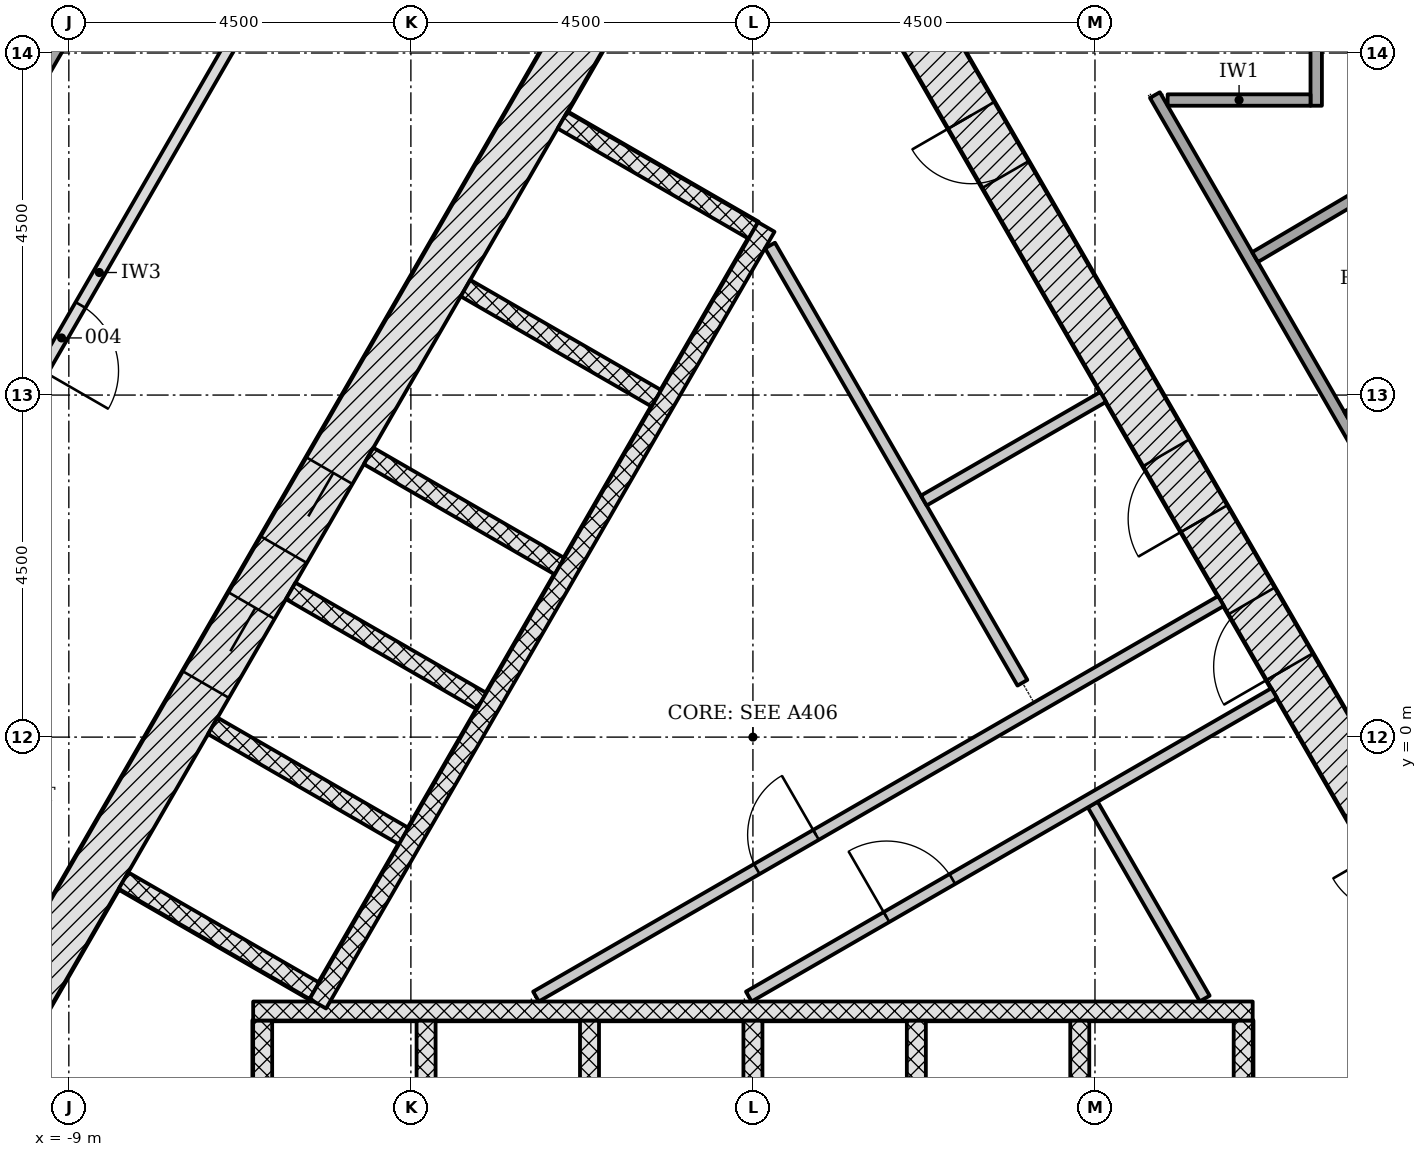
"""IFC4 building model, lengths in metres.
Left out: names, types, materials, properties, quantities, classifications, styles, units other than length and angle.
Written with IfcOpenShell. Run it as: python <this file> out.ifc"""

import sys

from ifc_helpers import new_model, si_unit, direction, frame, frame_2d, origin, place, context, subcontext, project, spatial, rectangle, extrude, element, fill, save


model = new_model("IFC4")
c1 = context("Model", 3, precision=1e-05, world=origin(), true_north=direction((0.0, 1.0)))
c2 = subcontext(c1, "Body", "Model", "MODEL_VIEW")
j1 = project(units=[si_unit("LENGTHUNIT", "METRE"), si_unit("PLANEANGLEUNIT", "RADIAN")], contexts=[c1])
p1 = place(None, origin())
s1 = spatial("IfcSite", under=j1, at=p1, CompositionType="ELEMENT")
p2 = place(p1, origin())
s2 = spatial("IfcBuilding", under=s1, at=p2, CompositionType="ELEMENT")
p3 = place(p2, frame((0.0, 0.0, 98.7)))
s3 = spatial("IfcBuildingStorey", under=s2, at=p3, CompositionType="ELEMENT", Elevation=98.7)
p4 = place(p3, frame((10.311, -4.703, -0.2), z_axis=(0.0, 0.0, 1.0), x_axis=(-0.500001446645, 0.866024568562, 0.0)))
e1 = element("IfcWall", 1, at=p4, inside=s3, PredefinedType="SHEAR", context=c2, shape_type="SweptSolid", body=[
    extrude(rectangle(XDim=18.458, YDim=0.7, at=frame_2d((9.229, 0.0))), origin(), (0.0, 0.0, 1.0), 3.6),
])
p5 = place(p4, frame((6.5, 0.0, 0.2)))
e2 = element("IfcOpeningElement", 2, at=p5, cuts=e1, PredefinedType="OPENING", context=c2, shape_type="SweptSolid", body=[
    extrude(rectangle(XDim=1.0, YDim=2.1, at=frame_2d((0.5, 1.05))), frame((0.0, 0.36, 0.0), z_axis=(0.0, -1.0, 0.0), x_axis=(1.0, 0.0, 0.0)), (0.0, 0.0, 1.0), 0.72),
])
p6 = place(p4, frame((2.902, 0.0, 0.2)))
e3 = element("IfcOpeningElement", 3, at=p6, cuts=e1, PredefinedType="OPENING", context=c2, shape_type="SweptSolid", body=[
    extrude(rectangle(XDim=0.9, YDim=2.1, at=frame_2d((0.45, 1.05))), frame((0.0, 0.36, 0.0), z_axis=(0.0, -1.0, 0.0), x_axis=(1.0, 0.0, 0.0)), (0.0, 0.0, 1.0), 0.72),
])
p7 = place(p4, frame((8.75, 0.0, 0.2)))
e4 = element("IfcOpeningElement", 4, at=p7, cuts=e1, PredefinedType="OPENING", context=c2, shape_type="SweptSolid", body=[
    extrude(rectangle(XDim=1.0, YDim=2.1, at=frame_2d((0.5, 1.05))), frame((0.0, 0.36, 0.0), z_axis=(0.0, -1.0, 0.0), x_axis=(1.0, 0.0, 0.0)), (0.0, 0.0, 1.0), 0.72),
])
p8 = place(p4, frame((13.977, 0.0, 0.2)))
e5 = element("IfcOpeningElement", 5, at=p8, cuts=e1, PredefinedType="OPENING", context=c2, shape_type="SweptSolid", body=[
    extrude(rectangle(XDim=0.9, YDim=2.1, at=frame_2d((0.45, 1.05))), frame((0.0, 0.36, 0.0), z_axis=(0.0, -1.0, 0.0), x_axis=(1.0, 0.0, 0.0)), (0.0, 0.0, 1.0), 0.72),
])
p9 = place(p3, frame((-1.083, 11.281, -0.2), z_axis=(0.0, 0.0, 1.0), x_axis=(-0.500001446645, -0.866024568562, 0.0)))
e6 = element("IfcWall", 6, at=p9, inside=s3, PredefinedType="SHEAR", context=c2, shape_type="SweptSolid", body=[
    extrude(rectangle(XDim=18.458, YDim=0.7, at=frame_2d((9.229, 0.0))), origin(), (0.0, 0.0, 1.0), 3.6),
])
p10 = place(p9, frame((8.979, 0.0, 0.2)))
e7 = element("IfcOpeningElement", 7, at=p10, cuts=e6, PredefinedType="OPENING", context=c2, shape_type="SweptSolid", body=[
    extrude(rectangle(XDim=1.2, YDim=2.1, at=frame_2d((0.6, 1.05))), frame((0.0, 0.36, 0.0), z_axis=(0.0, -1.0, 0.0), x_axis=(1.0, 0.0, 0.0)), (0.0, 0.0, 1.0), 0.72),
])
p11 = place(p9, frame((11.029, 0.0, 0.2)))
e8 = element("IfcOpeningElement", 8, at=p11, cuts=e6, PredefinedType="OPENING", context=c2, shape_type="SweptSolid", body=[
    extrude(rectangle(XDim=1.2, YDim=2.1, at=frame_2d((0.6, 1.05))), frame((0.0, 0.36, 0.0), z_axis=(0.0, -1.0, 0.0), x_axis=(1.0, 0.0, 0.0)), (0.0, 0.0, 1.0), 0.72),
])
p12 = place(p3, frame((-10.311, -4.353, -0.2), z_axis=(0.0, 0.0, 1.0), x_axis=(0.500042739161, -0.866000726912, 0.0)))
e9 = element("IfcWall", 9, at=p12, inside=s3, PredefinedType="SHEAR", context=c2, shape_type="SweptSolid", body=[
    extrude(rectangle(XDim=2.771, YDim=0.7, at=frame_2d((1.386, 0.0))), origin(), (0.0, 0.0, 1.0), 3.6),
])
for number, where, z_axis, x_axis in (
    (10, (-6.45, -6.228, -0.2), (0.0, 0.0, 1.0), (0.0, 1.0, 0.0)),
    (11, (-4.3, -6.228, -0.2), (0.0, 0.0, 1.0), (0.0, 1.0, 0.0)),
    (12, (-2.15, -6.228, -0.2), (0.0, 0.0, 1.0), (0.0, 1.0, 0.0)),
    (13, (0.0, -6.228, -0.2), (0.0, 0.0, 1.0), (0.0, 1.0, 0.0)),
    (14, (2.15, -6.228, -0.2), (0.0, 0.0, 1.0), (0.0, 1.0, 0.0)),
    (15, (4.3, -6.228, -0.2), (0.0, 0.0, 1.0), (0.0, 1.0, 0.0)),
    (16, (6.45, -6.228, -0.2), (0.0, 0.0, 1.0), (0.0, 1.0, 0.0)),
):
    element("IfcWall", number, at=place(p3, frame(where, z_axis=z_axis, x_axis=x_axis)), inside=s3, PredefinedType="PARTITIONING", context=c2, shape_type="SweptSolid", body=[
        extrude(rectangle(XDim=2.5, YDim=0.25, at=frame_2d((1.25, 0.0))), origin(), (0.0, 0.0, 1.0), 3.6),
    ])
p13 = place(p3, frame((-6.575, -3.603, 0.0), z_axis=(0.0, 0.0, 1.0), x_axis=(1.0, 0.0, 0.0)))
e17 = element("IfcWall", 17, at=p13, inside=s3, PredefinedType="PARTITIONING", context=c2, shape_type="SweptSolid", body=[
    extrude(rectangle(XDim=13.15, YDim=0.25, at=frame_2d((6.575, 0.0))), origin(), (0.0, 0.0, 1.0), 3.4),
])
p14 = place(p3, frame((-2.506, 8.115, -0.2), z_axis=(0.0, 0.0, 1.0), x_axis=(0.865996321171, -0.50005036918, 0.0)))
e18 = element("IfcWall", 18, at=p14, inside=s3, PredefinedType="PARTITIONING", context=c2, shape_type="SweptSolid", body=[
    extrude(rectangle(XDim=2.9, YDim=0.25, at=frame_2d((1.45, 0.0))), origin(), (0.0, 0.0, 1.0), 3.6),
])
for number, where, z_axis, x_axis in (
    (19, (-3.781, 5.907, -0.2), (0.0, 0.0, 1.0), (0.866, -0.5, 0.0)),
    (20, (-5.056, 3.699, -0.2), (0.0, 0.0, 1.0), (0.866, -0.5, 0.0)),
    (21, (-6.081, 1.923, -0.2), (0.0, 0.0, 1.0), (0.866, -0.5, 0.0)),
    (22, (-7.106, 0.148, -0.2), (0.0, 0.0, 1.0), (0.866, -0.5, 0.0)),
    (23, (-8.281, -1.887, -0.2), (0.0, 0.0, 1.0), (0.866, -0.5, 0.0)),
):
    element("IfcWall", number, at=place(p3, frame(where, z_axis=z_axis, x_axis=x_axis)), inside=s3, PredefinedType="PARTITIONING", context=c2, shape_type="SweptSolid", body=[
        extrude(rectangle(XDim=2.9, YDim=0.25, at=frame_2d((1.45, 0.0))), origin(), (0.0, 0.0, 1.0), 3.6),
    ])
p15 = place(p3, frame((0.176, 6.711, 0.0), z_axis=(0.0, 0.0, 1.0), x_axis=(-0.500004227369, -0.866022963098, 0.0)))
e24 = element("IfcWall", 24, at=p15, inside=s3, PredefinedType="PARTITIONING", context=c2, shape_type="SweptSolid", body=[
    extrude(rectangle(XDim=11.8, YDim=0.25, at=frame_2d((5.9, 0.0))), origin(), (0.0, 0.0, 1.0), 3.4),
])
p16 = place(p3, frame((-2.854, -3.413, 0.0), z_axis=(0.0, 0.0, 1.0), x_axis=(0.866030102318, 0.499991861813, 0.0)))
e25 = element("IfcWall", 25, at=p16, inside=s3, PredefinedType="PARTITIONING", context=c2, shape_type="SweptSolid", body=[
    extrude(rectangle(XDim=10.407, YDim=0.15, at=frame_2d((5.204, 0.0))), origin(), (0.0, 0.0, 1.0), 3.4),
])
p17 = place(p16, frame((3.354, 0.0, 0.0)))
e26 = element("IfcOpeningElement", 26, at=p17, cuts=e25, PredefinedType="OPENING", context=c2, shape_type="SweptSolid", body=[
    extrude(rectangle(XDim=0.9, YDim=2.1, at=frame_2d((0.45, 1.05))), frame((0.0, 0.085, 0.0), z_axis=(0.0, -1.0, 0.0), x_axis=(1.0, 0.0, 0.0)), (0.0, 0.0, 1.0), 0.17),
])
p18 = place(p3, frame((5.944, -3.439, 0.0), z_axis=(0.0, 0.0, 1.0), x_axis=(-0.499997367627, 0.86602692358, 0.0)))
e27 = element("IfcWall", 27, at=p18, inside=s3, PredefinedType="PARTITIONING", context=c2, shape_type="SweptSolid", body=[
    extrude(rectangle(XDim=2.947, YDim=0.15, at=frame_2d((1.473, 0.0))), origin(), (0.0, 0.0, 1.0), 3.4),
])
p19 = place(p3, frame((-0.054, -3.413, 0.0), z_axis=(0.0, 0.0, 1.0), x_axis=(0.866026668906, 0.499997808738, 0.0)))
e28 = element("IfcWall", 28, at=p19, inside=s3, PredefinedType="PARTITIONING", context=c2, shape_type="SweptSolid", body=[
    extrude(rectangle(XDim=7.982, YDim=0.15, at=frame_2d((3.991, 0.0))), origin(), (0.0, 0.0, 1.0), 3.4),
])
p20 = place(p19, frame((2.092, 0.0, 0.0)))
e29 = element("IfcOpeningElement", 29, at=p20, cuts=e28, PredefinedType="OPENING", context=c2, shape_type="SweptSolid", body=[
    extrude(rectangle(XDim=1.0, YDim=2.1, at=frame_2d((0.5, 1.05))), frame((0.0, 0.085, 0.0), z_axis=(0.0, -1.0, 0.0), x_axis=(1.0, 0.0, 0.0)), (0.0, 0.0, 1.0), 0.17),
])
p21 = place(p3, frame((3.546, 0.715, 0.0), z_axis=(0.0, 0.0, 1.0), x_axis=(-0.50002895357, 0.866008686788, 0.0)))
e30 = element("IfcWall", 30, at=p21, inside=s3, PredefinedType="PARTITIONING", context=c2, shape_type="SweptSolid", body=[
    extrude(rectangle(XDim=6.642, YDim=0.15, at=frame_2d((3.321, 0.0))), origin(), (0.0, 0.0, 1.0), 3.4),
])
p22 = place(p3, frame((2.248, 3.112, 0.0), z_axis=(0.0, 0.0, 1.0), x_axis=(0.866012511928, 0.500022328685, 0.0)))
e31 = element("IfcWall", 31, at=p22, inside=s3, PredefinedType="PARTITIONING", context=c2, shape_type="SweptSolid", body=[
    extrude(rectangle(XDim=2.725, YDim=0.15, at=frame_2d((1.363, 0.0))), origin(), (0.0, 0.0, 1.0), 3.4),
])
p23 = place(p3, frame((-16.169, -3.099, 0.0), z_axis=(0.0, 0.0, 1.0), x_axis=(0.499999805269, 0.866025516212, 0.0)))
e32 = element("IfcWall", 32, at=p23, inside=s3, PredefinedType="PARTITIONING", context=c2, shape_type="SweptSolid", body=[
    extrude(rectangle(XDim=22.097, YDim=0.15, at=frame_2d((11.049, 0.0))), origin(), (0.0, 0.0, 1.0), 2.778),
])
p24 = place(p23, frame((16.878, 0.0, 0.0)))
e33 = element("IfcOpeningElement", 33, at=p24, cuts=e32, PredefinedType="OPENING", context=c2, shape_type="SweptSolid", body=[
    extrude(rectangle(XDim=1.0, YDim=2.1, at=frame_2d((0.5, 1.05))), frame((0.0, 0.085, 0.0), z_axis=(0.0, -1.0, 0.0), x_axis=(1.0, 0.0, 0.0)), (0.0, 0.0, 1.0), 0.17),
])
p25 = place(p23, frame((7.816, 0.0, 0.0)))
e34 = element("IfcOpeningElement", 34, at=p25, cuts=e32, PredefinedType="OPENING", context=c2, shape_type="SweptSolid", body=[
    extrude(rectangle(XDim=1.5, YDim=2.1, at=frame_2d((0.75, 1.05))), frame((0.0, 0.085, 0.0), z_axis=(0.0, -1.0, 0.0), x_axis=(1.0, 0.0, 0.0)), (0.0, 0.0, 1.0), 0.17),
])
p26 = place(p23, frame((1.2, 0.0, 0.0)))
e35 = element("IfcOpeningElement", 35, at=p26, cuts=e32, PredefinedType="OPENING", context=c2, shape_type="SweptSolid", body=[
    extrude(rectangle(XDim=1.5, YDim=2.1, at=frame_2d((0.75, 1.05))), frame((0.0, 0.085, 0.0), z_axis=(0.0, -1.0, 0.0), x_axis=(1.0, 0.0, 0.0)), (0.0, 0.0, 1.0), 0.17),
])
p27 = place(p3, frame((-4.407, 13.374, 0.0), z_axis=(0.0, 0.0, 1.0), x_axis=(-0.499997181693, -0.866027030928, 0.0)))
e36 = element("IfcWall", 36, at=p27, inside=s3, PredefinedType="PARTITIONING", context=c2, shape_type="SweptSolid", body=[
    extrude(rectangle(XDim=16.77, YDim=0.15, at=frame_2d((8.385, 0.0))), origin(), (0.0, 0.0, 1.0), 2.778),
])
p28 = place(p27, frame((8.879, 0.0, 0.0)))
e37 = element("IfcOpeningElement", 37, at=p28, cuts=e36, PredefinedType="OPENING", context=c2, shape_type="SweptSolid", body=[
    extrude(rectangle(XDim=1.0, YDim=2.1, at=frame_2d((0.5, 1.05))), frame((0.0, 0.085, 0.0), z_axis=(0.0, -1.0, 0.0), x_axis=(1.0, 0.0, 0.0)), (0.0, 0.0, 1.0), 0.17),
])
p29 = place(p3, frame((5.289, 8.446, 0.0), z_axis=(0.0, 0.0, 1.0), x_axis=(0.499996620721, -0.866027354803, 0.0)))
e38 = element("IfcWall", 38, at=p29, inside=s3, PredefinedType="PARTITIONING", context=c2, shape_type="SweptSolid", body=[
    extrude(rectangle(XDim=15.057, YDim=0.15, at=frame_2d((7.528, 0.0))), origin(), (0.0, 0.0, 1.0), 2.778),
])
p30 = place(p29, frame((12.566, 0.0, 0.0)))
e39 = element("IfcOpeningElement", 39, at=p30, cuts=e38, PredefinedType="OPENING", context=c2, shape_type="SweptSolid", body=[
    extrude(rectangle(XDim=1.0, YDim=2.1, at=frame_2d((0.5, 1.05))), frame((0.0, 0.085, 0.0), z_axis=(0.0, -1.0, 0.0), x_axis=(1.0, 0.0, 0.0)), (0.0, 0.0, 1.0), 0.17),
])
p31 = place(p29, frame((7.316, 0.0, 0.0)))
e40 = element("IfcOpeningElement", 40, at=p31, cuts=e38, PredefinedType="OPENING", context=c2, shape_type="SweptSolid", body=[
    extrude(rectangle(XDim=1.0, YDim=2.1, at=frame_2d((0.5, 1.05))), frame((0.0, 0.085, 0.0), z_axis=(0.0, -1.0, 0.0), x_axis=(1.0, 0.0, 0.0)), (0.0, 0.0, 1.0), 0.17),
])
p32 = place(p29, frame((5.357, 0.0, 0.0)))
e41 = element("IfcOpeningElement", 41, at=p32, cuts=e38, PredefinedType="OPENING", context=c2, shape_type="SweptSolid", body=[
    extrude(rectangle(XDim=1.0, YDim=2.1, at=frame_2d((0.5, 1.05))), frame((0.0, 0.085, 0.0), z_axis=(0.0, -1.0, 0.0), x_axis=(1.0, 0.0, 0.0)), (0.0, 0.0, 1.0), 0.17),
])
p33 = place(p3, frame((7.411, 14.256, 0.0), z_axis=(0.0, 0.0, 1.0), x_axis=(0.0, -1.0, 0.0)))
e42 = element("IfcWall", 42, at=p33, inside=s3, PredefinedType="PARTITIONING", context=c2, shape_type="SweptSolid", body=[
    extrude(rectangle(XDim=5.95, YDim=0.15, at=frame_2d((2.975, 0.0))), origin(), (0.0, 0.0, 1.0), 2.778),
])
p34 = place(p33, frame((2.475, 0.0, 0.0)))
e43 = element("IfcOpeningElement", 43, at=p34, cuts=e42, PredefinedType="OPENING", context=c2, shape_type="SweptSolid", body=[
    extrude(rectangle(XDim=1.0, YDim=2.1, at=frame_2d((0.5, 1.05))), frame((0.0, 0.085, 0.0), z_axis=(0.0, -1.0, 0.0), x_axis=(1.0, 0.0, 0.0)), (0.0, 0.0, 1.0), 0.17),
])
p35 = place(p3, frame((5.456, 8.381, 0.0), z_axis=(0.0, 0.0, 1.0), x_axis=(1.0, 0.0, 0.0)))
e44 = element("IfcWall", 44, at=p35, inside=s3, PredefinedType="PARTITIONING", context=c2, shape_type="SweptSolid", body=[
    extrude(rectangle(XDim=1.88, YDim=0.15, at=frame_2d((0.94, 0.0))), origin(), (0.0, 0.0, 1.0), 3.4),
])
p36 = place(p3, frame((13.269, 10.25, 0.0), z_axis=(0.0, 0.0, 1.0), x_axis=(-0.861057776749, -0.508507133775, 0.0)))
e45 = element("IfcWall", 45, at=p36, inside=s3, PredefinedType="PARTITIONING", context=c2, shape_type="SweptSolid", body=[
    extrude(rectangle(XDim=7.738, YDim=0.15, at=frame_2d((3.869, 0.0))), origin(), (0.0, 0.0, 1.0), 2.778),
])
p37 = place(p3, frame((7.805, 4.237, 0.0), z_axis=(0.0, 0.0, 1.0), x_axis=(0.866006032174, 0.500033551112, 0.0)))
e46 = element("IfcWall", 46, at=p37, inside=s3, PredefinedType="PARTITIONING", context=c2, shape_type="SweptSolid", body=[
    extrude(rectangle(XDim=2.4, YDim=0.1, at=frame_2d((1.2, 0.0))), origin(), (0.0, 0.0, 1.0), 3.4),
])
p38 = place(p37, frame((0.7, 0.0, 0.0)))
e47 = element("IfcOpeningElement", 47, at=p38, cuts=e46, PredefinedType="OPENING", context=c2, shape_type="SweptSolid", body=[
    extrude(rectangle(XDim=1.0, YDim=2.1, at=frame_2d((0.5, 1.05))), frame((0.0, 0.06, 0.0), z_axis=(0.0, -1.0, 0.0), x_axis=(1.0, 0.0, 0.0)), (0.0, 0.0, 1.0), 0.12),
])
p39 = place(p10, origin())
e48 = element("IfcDoor", 48, at=p39, inside=s3, OperationType="DOUBLE_DOOR_SLIDING", PredefinedType="DOOR", context=c2, shape_type="SweptSolid", body=[
    extrude(rectangle(XDim=1.2, YDim=2.1, at=frame_2d((0.6, 1.05))), frame((0.0, 0.025, 0.0), z_axis=(0.0, -1.0, 0.0), x_axis=(1.0, 0.0, 0.0)), (0.0, 0.0, 1.0), 0.05),
])
fill(e7, e48)
p40 = place(p11, origin())
e49 = element("IfcDoor", 49, at=p40, inside=s3, OperationType="DOUBLE_DOOR_SLIDING", PredefinedType="DOOR", context=c2, shape_type="SweptSolid", body=[
    extrude(rectangle(XDim=1.2, YDim=2.1, at=frame_2d((0.6, 1.05))), frame((0.0, 0.025, 0.0), z_axis=(0.0, -1.0, 0.0), x_axis=(1.0, 0.0, 0.0)), (0.0, 0.0, 1.0), 0.05),
])
fill(e8, e49)
p41 = place(p5, origin())
e50 = element("IfcDoor", 50, at=p41, inside=s3, OperationType="SINGLE_SWING_LEFT", PredefinedType="DOOR", context=c2, shape_type="SweptSolid", body=[
    extrude(rectangle(XDim=1.0, YDim=2.1, at=frame_2d((0.5, 1.05))), frame((0.0, 0.075, 0.0), z_axis=(0.0, -1.0, 0.0), x_axis=(1.0, 0.0, 0.0)), (0.0, 0.0, 1.0), 0.15),
])
fill(e2, e50)
p42 = place(p7, origin())
e51 = element("IfcDoor", 51, at=p42, inside=s3, OperationType="SINGLE_SWING_LEFT", PredefinedType="DOOR", context=c2, shape_type="SweptSolid", body=[
    extrude(rectangle(XDim=1.0, YDim=2.1, at=frame_2d((0.5, 1.05))), frame((0.0, 0.075, 0.0), z_axis=(0.0, -1.0, 0.0), x_axis=(1.0, 0.0, 0.0)), (0.0, 0.0, 1.0), 0.15),
])
fill(e4, e51)
p43 = place(p8, origin())
e52 = element("IfcDoor", 52, at=p43, inside=s3, OperationType="SINGLE_SWING_RIGHT", PredefinedType="DOOR", context=c2, shape_type="SweptSolid", body=[
    extrude(rectangle(XDim=0.9, YDim=2.1, at=frame_2d((0.45, 1.05))), frame((0.0, 0.075, 0.0), z_axis=(0.0, -1.0, 0.0), x_axis=(1.0, 0.0, 0.0)), (0.0, 0.0, 1.0), 0.15),
])
fill(e5, e52)
p44 = place(p20, origin())
e53 = element("IfcDoor", 53, at=p44, inside=s3, OperationType="SINGLE_SWING_LEFT", PredefinedType="DOOR", context=c2, shape_type="SweptSolid", body=[
    extrude(rectangle(XDim=1.0, YDim=2.1, at=frame_2d((0.5, 1.05))), frame((0.0, 0.025, 0.0), z_axis=(0.0, -1.0, 0.0), x_axis=(1.0, 0.0, 0.0)), (0.0, 0.0, 1.0), 0.05),
])
fill(e29, e53)
p45 = place(p17, origin())
e54 = element("IfcDoor", 54, at=p45, inside=s3, OperationType="SINGLE_SWING_RIGHT", PredefinedType="DOOR", context=c2, shape_type="SweptSolid", body=[
    extrude(rectangle(XDim=0.9, YDim=2.1, at=frame_2d((0.45, 1.05))), frame((0.0, 0.025, 0.0), z_axis=(0.0, -1.0, 0.0), x_axis=(1.0, 0.0, 0.0)), (0.0, 0.0, 1.0), 0.05),
])
fill(e26, e54)
p46 = place(p28, origin())
e55 = element("IfcDoor", 55, at=p46, inside=s3, OperationType="SINGLE_SWING_RIGHT", PredefinedType="DOOR", context=c2, shape_type="SweptSolid", body=[
    extrude(rectangle(XDim=1.0, YDim=2.1, at=frame_2d((0.5, 1.05))), frame((0.0, 0.025, 0.0), z_axis=(0.0, -1.0, 0.0), x_axis=(1.0, 0.0, 0.0)), (0.0, 0.0, 1.0), 0.05),
])
fill(e37, e55)
save(model, sys.argv[1])
